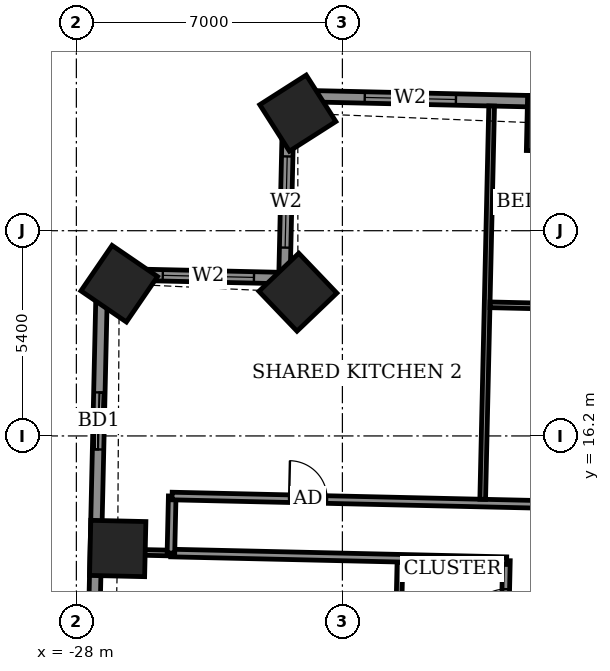
"""IFC4 building model, lengths in metres.
Left out: names, types, materials, properties, quantities, classifications, styles, units other than length and angle.
Written with IfcOpenShell. Run it as: python <this file> out.ifc"""

import sys

from ifc_helpers import new_model, si_unit, direction, frame, frame_2d, origin, origin_2d, place, context, subcontext, project, spatial, rectangle, extrude, element, fill, save


model = new_model("IFC4")
c1 = context("Model", 3, precision=1e-05, world=origin(), true_north=direction((0.0, 1.0)))
c2 = subcontext(c1, "Body", "Model", "MODEL_VIEW")
j1 = project(units=[si_unit("LENGTHUNIT", "METRE"), si_unit("PLANEANGLEUNIT", "RADIAN")], contexts=[c1])
p1 = place(None, origin())
s1 = spatial("IfcSite", under=j1, at=p1, CompositionType="ELEMENT")
p2 = place(p1, origin())
s2 = spatial("IfcBuilding", under=s1, at=p2, CompositionType="ELEMENT")
p3 = place(p2, frame((0.0, 0.0, 71.1)))
s3 = spatial("IfcBuildingStorey", under=s2, at=p3, CompositionType="ELEMENT", Elevation=71.1)
for number, where, z_axis, x_axis in (
    (1, (-15.418, 24.418, -0.55), (0.0, 0.0, 1.0), (-1.0, 0.023, 0.0)),
    (2, (-22.173, 24.694, -0.55), (0.0, 0.0, 1.0), (-0.843, -0.538, 0.0)),
    (3, (-22.171, 19.982, -0.55), (0.0, 0.0, 1.0), (-0.723, -0.691, 0.0)),
    (4, (-26.872, 20.205, -0.55), (0.0, 0.0, 1.0), (-0.565, -0.825, 0.0)),
    (5, (-26.912, 13.239, -0.55), (0.0, 0.0, 1.0), (-0.023, -1.0, 0.0)),
):
    element("IfcColumn", number, at=place(p3, frame(where, z_axis=z_axis, x_axis=x_axis)), inside=s3, PredefinedType="COLUMN", context=c2, shape_type="SweptSolid", body=[
        extrude(rectangle(XDim=1.45, YDim=1.45, at=origin_2d()), origin(), (0.0, 0.0, 1.0), 3.6),
    ])
p4 = place(p3, frame((27.407, 24.021, 0.0), z_axis=(0.0, 0.0, 1.0), x_axis=(-0.99974239923, 0.022696589664, 0.0)))
e6 = element("IfcWall", 6, at=p4, inside=s3, PredefinedType="SOLIDWALL", context=c2, shape_type="SweptSolid", body=[
    extrude(rectangle(XDim=49.836, YDim=0.3, at=frame_2d((24.918, 0.0))), origin(), (0.0, 0.0, 1.0), 3.05),
])
p5 = place(p4, frame((2.998, 0.0, 0.0)))
e7 = element("IfcOpeningElement", 7, at=p5, cuts=e6, PredefinedType="OPENING", context=c2, shape_type="SweptSolid", body=[
    extrude(rectangle(XDim=1.5, YDim=2.4, at=frame_2d((0.75, 1.2))), frame((0.0, 0.16, 0.0), z_axis=(0.0, -1.0, 0.0), x_axis=(1.0, 0.0, 0.0)), (0.0, 0.0, 1.0), 0.32),
])
p6 = place(p4, frame((9.086, 0.0, 0.0)))
e8 = element("IfcOpeningElement", 8, at=p6, cuts=e6, PredefinedType="OPENING", context=c2, shape_type="SweptSolid", body=[
    extrude(rectangle(XDim=1.5, YDim=2.4, at=frame_2d((0.75, 1.2))), frame((0.0, 0.16, 0.0), z_axis=(0.0, -1.0, 0.0), x_axis=(1.0, 0.0, 0.0)), (0.0, 0.0, 1.0), 0.32),
])
p7 = place(p4, frame((15.017, 0.0, 0.0)))
e9 = element("IfcOpeningElement", 9, at=p7, cuts=e6, PredefinedType="OPENING", context=c2, shape_type="SweptSolid", body=[
    extrude(rectangle(XDim=1.5, YDim=2.4, at=frame_2d((0.75, 1.2))), frame((0.0, 0.16, 0.0), z_axis=(0.0, -1.0, 0.0), x_axis=(1.0, 0.0, 0.0)), (0.0, 0.0, 1.0), 0.32),
])
p8 = place(p4, frame((18.124, 0.0, 0.0)))
e10 = element("IfcOpeningElement", 10, at=p8, cuts=e6, PredefinedType="OPENING", context=c2, shape_type="SweptSolid", body=[
    extrude(rectangle(XDim=1.5, YDim=2.4, at=frame_2d((0.75, 1.2))), frame((0.0, 0.16, 0.0), z_axis=(0.0, -1.0, 0.0), x_axis=(1.0, 0.0, 0.0)), (0.0, 0.0, 1.0), 0.32),
])
p9 = place(p4, frame((23.149, 0.0, 0.0)))
e11 = element("IfcOpeningElement", 11, at=p9, cuts=e6, PredefinedType="OPENING", context=c2, shape_type="SweptSolid", body=[
    extrude(rectangle(XDim=1.5, YDim=2.4, at=frame_2d((0.75, 1.2))), frame((0.0, 0.16, 0.0), z_axis=(0.0, -1.0, 0.0), x_axis=(1.0, 0.0, 0.0)), (0.0, 0.0, 1.0), 0.32),
])
p10 = place(p4, frame((26.405, 0.0, 0.0)))
e12 = element("IfcOpeningElement", 12, at=p10, cuts=e6, PredefinedType="OPENING", context=c2, shape_type="SweptSolid", body=[
    extrude(rectangle(XDim=1.2, YDim=2.4, at=frame_2d((0.6, 1.2))), frame((0.0, 0.16, 0.0), z_axis=(0.0, -1.0, 0.0), x_axis=(1.0, 0.0, 0.0)), (0.0, 0.0, 1.0), 0.32),
])
p11 = place(p4, frame((31.986, 0.0, 0.0)))
e13 = element("IfcOpeningElement", 13, at=p11, cuts=e6, PredefinedType="OPENING", context=c2, shape_type="SweptSolid", body=[
    extrude(rectangle(XDim=1.5, YDim=2.4, at=frame_2d((0.75, 1.2))), frame((0.0, 0.16, 0.0), z_axis=(0.0, -1.0, 0.0), x_axis=(1.0, 0.0, 0.0)), (0.0, 0.0, 1.0), 0.32),
])
p12 = place(p4, frame((37.211, 0.0, 0.0)))
e14 = element("IfcOpeningElement", 14, at=p12, cuts=e6, PredefinedType="OPENING", context=c2, shape_type="SweptSolid", body=[
    extrude(rectangle(XDim=1.5, YDim=2.4, at=frame_2d((0.75, 1.2))), frame((0.0, 0.16, 0.0), z_axis=(0.0, -1.0, 0.0), x_axis=(1.0, 0.0, 0.0)), (0.0, 0.0, 1.0), 0.32),
])
p13 = place(p4, frame((40.317, 0.0, 0.0)))
e15 = element("IfcOpeningElement", 15, at=p13, cuts=e6, PredefinedType="OPENING", context=c2, shape_type="SweptSolid", body=[
    extrude(rectangle(XDim=1.5, YDim=2.4, at=frame_2d((0.75, 1.2))), frame((0.0, 0.16, 0.0), z_axis=(0.0, -1.0, 0.0), x_axis=(1.0, 0.0, 0.0)), (0.0, 0.0, 1.0), 0.32),
])
p14 = place(p4, frame((45.431, 0.0, 0.9)))
e16 = element("IfcOpeningElement", 16, at=p14, cuts=e6, PredefinedType="OPENING", context=c2, shape_type="SweptSolid", body=[
    extrude(rectangle(XDim=2.4, YDim=1.5, at=frame_2d((1.2, 0.75))), frame((0.0, 0.16, 0.0), z_axis=(0.0, -1.0, 0.0), x_axis=(1.0, 0.0, 0.0)), (0.0, 0.0, 1.0), 0.32),
])
p15 = place(p3, frame((-22.415, 25.183, 0.0), z_axis=(0.0, 0.0, 1.0), x_axis=(-0.022739771436, -0.999741417965, 0.0)))
e17 = element("IfcWall", 17, at=p15, inside=s3, PredefinedType="SOLIDWALL", context=c2, shape_type="SweptSolid", body=[
    extrude(rectangle(XDim=4.831, YDim=0.3, at=frame_2d((2.416, 0.0))), origin(), (0.0, 0.0, 1.0), 2.55),
])
p16 = place(p15, frame((1.629, 0.0, 0.9)))
e18 = element("IfcOpeningElement", 18, at=p16, cuts=e17, PredefinedType="OPENING", context=c2, shape_type="SweptSolid", body=[
    extrude(rectangle(XDim=2.4, YDim=1.5, at=frame_2d((1.2, 0.75))), frame((0.0, 0.16, 0.0), z_axis=(0.0, -1.0, 0.0), x_axis=(1.0, 0.0, 0.0)), (0.0, 0.0, 1.0), 0.32),
])
p17 = place(p3, frame((-22.215, 20.346, 0.0), z_axis=(0.0, 0.0, 1.0), x_axis=(-0.999742476424, 0.022693189157, 0.0)))
e19 = element("IfcWall", 19, at=p17, inside=s3, PredefinedType="SOLIDWALL", context=c2, shape_type="SweptSolid", body=[
    extrude(rectangle(XDim=5.11, YDim=0.3, at=frame_2d((2.555, 0.0))), origin(), (0.0, 0.0, 1.0), 2.55),
])
p18 = place(p17, frame((1.112, 0.0, 0.9)))
e20 = element("IfcOpeningElement", 20, at=p18, cuts=e19, PredefinedType="OPENING", context=c2, shape_type="SweptSolid", body=[
    extrude(rectangle(XDim=2.4, YDim=1.5, at=frame_2d((1.2, 0.75))), frame((0.0, 0.16, 0.0), z_axis=(0.0, -1.0, 0.0), x_axis=(1.0, 0.0, 0.0)), (0.0, 0.0, 1.0), 0.32),
])
p19 = place(p3, frame((-27.324, 20.462, 0.0), z_axis=(0.0, 0.0, 1.0), x_axis=(-0.022695628174, -0.999742421057, 0.0)))
e21 = element("IfcWall", 21, at=p19, inside=s3, PredefinedType="SOLIDWALL", context=c2, shape_type="SweptSolid", body=[
    extrude(rectangle(XDim=14.63, YDim=0.3, at=frame_2d((7.315, 0.0))), origin(), (0.0, 0.0, 1.0), 3.05),
])
p20 = place(p19, frame((3.118, 0.0, 0.0)))
e22 = element("IfcOpeningElement", 22, at=p20, cuts=e21, PredefinedType="OPENING", context=c2, shape_type="SweptSolid", body=[
    extrude(rectangle(XDim=1.5, YDim=2.4, at=frame_2d((0.75, 1.2))), frame((0.0, 0.16, 0.0), z_axis=(0.0, -1.0, 0.0), x_axis=(1.0, 0.0, 0.0)), (0.0, 0.0, 1.0), 0.32),
])
p21 = place(p19, frame((8.431, 0.0, 0.9)))
e23 = element("IfcOpeningElement", 23, at=p21, cuts=e21, PredefinedType="OPENING", context=c2, shape_type="SweptSolid", body=[
    extrude(rectangle(XDim=2.4, YDim=1.5, at=frame_2d((1.2, 0.75))), frame((0.0, 0.16, 0.0), z_axis=(0.0, -1.0, 0.0), x_axis=(1.0, 0.0, 0.0)), (0.0, 0.0, 1.0), 0.32),
])
p22 = place(p19, frame((12.188, 0.0, 0.9)))
e24 = element("IfcOpeningElement", 24, at=p22, cuts=e21, PredefinedType="OPENING", context=c2, shape_type="SweptSolid", body=[
    extrude(rectangle(XDim=1.2, YDim=1.5, at=frame_2d((0.6, 0.75))), frame((0.0, 0.16, 0.0), z_axis=(0.0, -1.0, 0.0), x_axis=(1.0, 0.0, 0.0)), (0.0, 0.0, 1.0), 0.32),
])
p23 = place(p3, frame((-17.287, -13.625, 0.0), z_axis=(0.0, 0.0, 1.0), x_axis=(0.022712214871, 0.999742044377, 0.0)))
e25 = element("IfcWall", 25, at=p23, inside=s3, PredefinedType="PARTITIONING", context=c2, shape_type="SweptSolid", body=[
    extrude(rectangle(XDim=26.551, YDim=0.2, at=frame_2d((13.275, 0.0))), origin(), (0.0, 0.0, 1.0), 3.05),
])
p24 = place(p23, frame((22.738, 0.0, 0.0)))
e26 = element("IfcOpeningElement", 26, at=p24, cuts=e25, PredefinedType="OPENING", context=c2, shape_type="SweptSolid", body=[
    extrude(rectangle(XDim=1.0, YDim=2.1, at=frame_2d((0.5, 1.05))), frame((0.0, 0.11, 0.0), z_axis=(0.0, -1.0, 0.0), x_axis=(1.0, 0.0, 0.0)), (0.0, 0.0, 1.0), 0.22),
])
p25 = place(p23, frame((24.9, 0.0, 0.0)))
e27 = element("IfcOpeningElement", 27, at=p25, cuts=e25, PredefinedType="OPENING", context=c2, shape_type="SweptSolid", body=[
    extrude(rectangle(XDim=0.9, YDim=2.1, at=frame_2d((0.45, 1.05))), frame((0.0, 0.11, 0.0), z_axis=(0.0, -1.0, 0.0), x_axis=(1.0, 0.0, 0.0)), (0.0, 0.0, 1.0), 0.22),
])
p26 = place(p23, frame((20.3, 0.0, 0.0)))
e28 = element("IfcOpeningElement", 28, at=p26, cuts=e25, PredefinedType="OPENING", context=c2, shape_type="SweptSolid", body=[
    extrude(rectangle(XDim=1.0, YDim=2.1, at=frame_2d((0.5, 1.05))), frame((0.0, 0.11, 0.0), z_axis=(0.0, -1.0, 0.0), x_axis=(1.0, 0.0, 0.0)), (0.0, 0.0, 1.0), 0.22),
])
p27 = place(p23, frame((15.025, 0.0, 0.0)))
e29 = element("IfcOpeningElement", 29, at=p27, cuts=e25, PredefinedType="OPENING", context=c2, shape_type="SweptSolid", body=[
    extrude(rectangle(XDim=1.0, YDim=2.1, at=frame_2d((0.5, 1.05))), frame((0.0, 0.11, 0.0), z_axis=(0.0, -1.0, 0.0), x_axis=(1.0, 0.0, 0.0)), (0.0, 0.0, 1.0), 0.22),
])
p28 = place(p23, frame((17.525, 0.0, 0.0)))
e30 = element("IfcOpeningElement", 30, at=p28, cuts=e25, PredefinedType="OPENING", context=c2, shape_type="SweptSolid", body=[
    extrude(rectangle(XDim=0.9, YDim=2.1, at=frame_2d((0.45, 1.05))), frame((0.0, 0.11, 0.0), z_axis=(0.0, -1.0, 0.0), x_axis=(1.0, 0.0, 0.0)), (0.0, 0.0, 1.0), 0.22),
])
p29 = place(p23, frame((11.678, 0.0, 0.0)))
e31 = element("IfcOpeningElement", 31, at=p29, cuts=e25, PredefinedType="OPENING", context=c2, shape_type="SweptSolid", body=[
    extrude(rectangle(XDim=1.0, YDim=2.1, at=frame_2d((0.5, 1.05))), frame((0.0, 0.11, 0.0), z_axis=(0.0, -1.0, 0.0), x_axis=(1.0, 0.0, 0.0)), (0.0, 0.0, 1.0), 0.22),
])
p30 = place(p23, frame((8.45, 0.0, 0.0)))
e32 = element("IfcOpeningElement", 32, at=p30, cuts=e25, PredefinedType="OPENING", context=c2, shape_type="SweptSolid", body=[
    extrude(rectangle(XDim=1.0, YDim=2.1, at=frame_2d((0.5, 1.05))), frame((0.0, 0.11, 0.0), z_axis=(0.0, -1.0, 0.0), x_axis=(1.0, 0.0, 0.0)), (0.0, 0.0, 1.0), 0.22),
])
p31 = place(p23, frame((6.275, 0.0, 0.0)))
e33 = element("IfcOpeningElement", 33, at=p31, cuts=e25, PredefinedType="OPENING", context=c2, shape_type="SweptSolid", body=[
    extrude(rectangle(XDim=0.9, YDim=2.1, at=frame_2d((0.45, 1.05))), frame((0.0, 0.11, 0.0), z_axis=(0.0, -1.0, 0.0), x_axis=(1.0, 0.0, 0.0)), (0.0, 0.0, 1.0), 0.22),
])
p32 = place(p23, frame((1.062, 0.0, 0.0)))
e34 = element("IfcOpeningElement", 34, at=p32, cuts=e25, PredefinedType="OPENING", context=c2, shape_type="SweptSolid", body=[
    extrude(rectangle(XDim=1.0, YDim=2.1, at=frame_2d((0.5, 1.05))), frame((0.0, 0.11, 0.0), z_axis=(0.0, -1.0, 0.0), x_axis=(1.0, 0.0, 0.0)), (0.0, 0.0, 1.0), 0.22),
])
p33 = place(p23, frame((3.875, 0.0, 0.0)))
e35 = element("IfcOpeningElement", 35, at=p33, cuts=e25, PredefinedType="OPENING", context=c2, shape_type="SweptSolid", body=[
    extrude(rectangle(XDim=0.9, YDim=2.1, at=frame_2d((0.45, 1.05))), frame((0.0, 0.11, 0.0), z_axis=(0.0, -1.0, 0.0), x_axis=(1.0, 0.0, 0.0)), (0.0, 0.0, 1.0), 0.22),
])
p34 = place(p3, frame((-19.538, 10.583, 0.0), z_axis=(0.0, 0.0, 1.0), x_axis=(0.022612884682, 0.999744296031, 0.0)))
e36 = element("IfcWall", 36, at=p34, inside=s3, PredefinedType="PARTITIONING", context=c2, shape_type="SweptSolid", body=[
    extrude(rectangle(XDim=2.3, YDim=0.15, at=frame_2d((1.15, 0.0))), origin(), (0.0, 0.0, 1.0), 3.05),
])
p35 = place(p3, frame((-27.34, 13.16, 0.0), z_axis=(0.0, 0.0, 1.0), x_axis=(0.999748678707, -0.022418283238, 0.0)))
e37 = element("IfcWall", 37, at=p35, inside=s3, PredefinedType="PARTITIONING", context=c2, shape_type="SweptSolid", body=[
    extrude(rectangle(XDim=1.83, YDim=0.15, at=frame_2d((0.915, 0.0))), origin(), (0.0, 0.0, 1.0), 3.05),
])
p36 = place(p3, frame((-25.515, 13.119, 0.0), z_axis=(0.0, 0.0, 1.0), x_axis=(0.999741550249, -0.022733954903, 0.0)))
e38 = element("IfcWall", 38, at=p36, inside=s3, PredefinedType="PARTITIONING", context=c2, shape_type="SweptSolid", body=[
    extrude(rectangle(XDim=8.838, YDim=0.2, at=frame_2d((4.419, 0.0))), origin(), (0.0, 0.0, 1.0), 3.05),
])
p37 = place(p3, frame((-25.512, 13.119, 0.0), z_axis=(0.0, 0.0, 1.0), x_axis=(0.022617910375, 0.999744182344, 0.0)))
e39 = element("IfcWall", 39, at=p37, inside=s3, PredefinedType="PARTITIONING", context=c2, shape_type="SweptSolid", body=[
    extrude(rectangle(XDim=1.5, YDim=0.2, at=frame_2d((0.75, 0.0))), origin(), (0.0, 0.0, 1.0), 3.05),
])
p38 = place(p3, frame((-25.481, 14.619, 0.0), z_axis=(0.0, 0.0, 1.0), x_axis=(0.999742349682, -0.022698772048, 0.0)))
e40 = element("IfcWall", 40, at=p38, inside=s3, PredefinedType="PARTITIONING", context=c2, shape_type="SweptSolid", body=[
    extrude(rectangle(XDim=54.886, YDim=0.2, at=frame_2d((27.443, 0.0))), origin(), (0.0, 0.0, 1.0), 3.05),
])
p39 = place(p38, frame((52.093, 0.0, 0.0)))
e41 = element("IfcOpeningElement", 41, at=p39, cuts=e40, PredefinedType="OPENING", context=c2, shape_type="SweptSolid", body=[
    extrude(rectangle(XDim=1.0, YDim=2.1, at=frame_2d((0.5, 1.05))), frame((0.0, 0.11, 0.0), z_axis=(0.0, -1.0, 0.0), x_axis=(1.0, 0.0, 0.0)), (0.0, 0.0, 1.0), 0.22),
])
p40 = place(p38, frame((46.325, 0.0, 0.0)))
e42 = element("IfcOpeningElement", 42, at=p40, cuts=e40, PredefinedType="OPENING", context=c2, shape_type="SweptSolid", body=[
    extrude(rectangle(XDim=0.9, YDim=2.1, at=frame_2d((0.45, 1.05))), frame((0.0, 0.11, 0.0), z_axis=(0.0, -1.0, 0.0), x_axis=(1.0, 0.0, 0.0)), (0.0, 0.0, 1.0), 0.22),
])
p41 = place(p38, frame((41.275, 0.0, 0.0)))
e43 = element("IfcOpeningElement", 43, at=p41, cuts=e40, PredefinedType="OPENING", context=c2, shape_type="SweptSolid", body=[
    extrude(rectangle(XDim=0.9, YDim=2.1, at=frame_2d((0.45, 1.05))), frame((0.0, 0.11, 0.0), z_axis=(0.0, -1.0, 0.0), x_axis=(1.0, 0.0, 0.0)), (0.0, 0.0, 1.0), 0.22),
])
p42 = place(p38, frame((38.875, 0.0, 0.0)))
e44 = element("IfcOpeningElement", 44, at=p42, cuts=e40, PredefinedType="OPENING", context=c2, shape_type="SweptSolid", body=[
    extrude(rectangle(XDim=0.9, YDim=2.1, at=frame_2d((0.45, 1.05))), frame((0.0, 0.11, 0.0), z_axis=(0.0, -1.0, 0.0), x_axis=(1.0, 0.0, 0.0)), (0.0, 0.0, 1.0), 0.22),
])
p43 = place(p38, frame((31.95, 0.0, 0.0)))
e45 = element("IfcOpeningElement", 45, at=p43, cuts=e40, PredefinedType="OPENING", context=c2, shape_type="SweptSolid", body=[
    extrude(rectangle(XDim=0.9, YDim=2.1, at=frame_2d((0.45, 1.05))), frame((0.0, 0.11, 0.0), z_axis=(0.0, -1.0, 0.0), x_axis=(1.0, 0.0, 0.0)), (0.0, 0.0, 1.0), 0.22),
])
p44 = place(p38, frame((29.8, 0.0, 0.0)))
e46 = element("IfcOpeningElement", 46, at=p44, cuts=e40, PredefinedType="OPENING", context=c2, shape_type="SweptSolid", body=[
    extrude(rectangle(XDim=0.9, YDim=2.1, at=frame_2d((0.45, 1.05))), frame((0.0, 0.11, 0.0), z_axis=(0.0, -1.0, 0.0), x_axis=(1.0, 0.0, 0.0)), (0.0, 0.0, 1.0), 0.22),
])
p45 = place(p38, frame((22.875, 0.0, 0.0)))
e47 = element("IfcOpeningElement", 47, at=p45, cuts=e40, PredefinedType="OPENING", context=c2, shape_type="SweptSolid", body=[
    extrude(rectangle(XDim=0.9, YDim=2.1, at=frame_2d((0.45, 1.05))), frame((0.0, 0.11, 0.0), z_axis=(0.0, -1.0, 0.0), x_axis=(1.0, 0.0, 0.0)), (0.0, 0.0, 1.0), 0.22),
])
p46 = place(p38, frame((20.675, 0.0, 0.0)))
e48 = element("IfcOpeningElement", 48, at=p46, cuts=e40, PredefinedType="OPENING", context=c2, shape_type="SweptSolid", body=[
    extrude(rectangle(XDim=0.9, YDim=2.1, at=frame_2d((0.45, 1.05))), frame((0.0, 0.11, 0.0), z_axis=(0.0, -1.0, 0.0), x_axis=(1.0, 0.0, 0.0)), (0.0, 0.0, 1.0), 0.22),
])
p47 = place(p38, frame((13.525, 0.0, 0.0)))
e49 = element("IfcOpeningElement", 49, at=p47, cuts=e40, PredefinedType="OPENING", context=c2, shape_type="SweptSolid", body=[
    extrude(rectangle(XDim=0.9, YDim=2.1, at=frame_2d((0.45, 1.05))), frame((0.0, 0.11, 0.0), z_axis=(0.0, -1.0, 0.0), x_axis=(1.0, 0.0, 0.0)), (0.0, 0.0, 1.0), 0.22),
])
p48 = place(p38, frame((11.275, 0.0, 0.0)))
e50 = element("IfcOpeningElement", 50, at=p48, cuts=e40, PredefinedType="OPENING", context=c2, shape_type="SweptSolid", body=[
    extrude(rectangle(XDim=0.9, YDim=2.1, at=frame_2d((0.45, 1.05))), frame((0.0, 0.11, 0.0), z_axis=(0.0, -1.0, 0.0), x_axis=(1.0, 0.0, 0.0)), (0.0, 0.0, 1.0), 0.22),
])
p49 = place(p38, frame((3.079, 0.0, 0.0)))
e51 = element("IfcOpeningElement", 51, at=p49, cuts=e40, PredefinedType="OPENING", context=c2, shape_type="SweptSolid", body=[
    extrude(rectangle(XDim=1.0, YDim=2.1, at=frame_2d((0.5, 1.05))), frame((0.0, 0.11, 0.0), z_axis=(0.0, -1.0, 0.0), x_axis=(1.0, 0.0, 0.0)), (0.0, 0.0, 1.0), 0.22),
])
p50 = place(p3, frame((-17.308, 14.533, 0.0), z_axis=(0.0, 0.0, 1.0), x_axis=(0.022713904397, 0.999742005993, 0.0)))
e52 = element("IfcWall", 52, at=p50, inside=s3, PredefinedType="PARTITIONING", context=c2, shape_type="SweptSolid", body=[
    extrude(rectangle(XDim=10.351, YDim=0.15, at=frame_2d((5.175, 0.0))), origin(), (0.0, 0.0, 1.0), 2.55),
])
p51 = place(p3, frame((-17.115, 19.65, 0.0), z_axis=(0.0, 0.0, 1.0), x_axis=(0.999740478815, -0.022781023197, 0.0)))
e53 = element("IfcWall", 53, at=p51, inside=s3, PredefinedType="PARTITIONING", context=c2, shape_type="SweptSolid", body=[
    extrude(rectangle(XDim=2.325, YDim=0.15, at=frame_2d((1.163, 0.0))), origin(), (0.0, 0.0, 1.0), 3.05),
])
p52 = place(p14, origin())
e54 = element("IfcWindow", 54, at=p52, inside=s3, PartitioningType="DOUBLE_PANEL_VERTICAL", PredefinedType="WINDOW", context=c2, shape_type="SweptSolid", body=[
    extrude(rectangle(XDim=2.4, YDim=1.5, at=frame_2d((1.2, 0.75))), frame((0.0, 0.03, 0.0), z_axis=(0.0, -1.0, 0.0), x_axis=(1.0, 0.0, 0.0)), (0.0, 0.0, 1.0), 0.06),
])
fill(e16, e54)
p53 = place(p16, origin())
e55 = element("IfcWindow", 55, at=p53, inside=s3, PartitioningType="DOUBLE_PANEL_VERTICAL", PredefinedType="WINDOW", context=c2, shape_type="SweptSolid", body=[
    extrude(rectangle(XDim=2.4, YDim=1.5, at=frame_2d((1.2, 0.75))), frame((0.0, 0.03, 0.0), z_axis=(0.0, -1.0, 0.0), x_axis=(1.0, 0.0, 0.0)), (0.0, 0.0, 1.0), 0.06),
])
fill(e18, e55)
p54 = place(p18, origin())
e56 = element("IfcWindow", 56, at=p54, inside=s3, PartitioningType="DOUBLE_PANEL_VERTICAL", PredefinedType="WINDOW", context=c2, shape_type="SweptSolid", body=[
    extrude(rectangle(XDim=2.4, YDim=1.5, at=frame_2d((1.2, 0.75))), frame((0.0, 0.03, 0.0), z_axis=(0.0, -1.0, 0.0), x_axis=(1.0, 0.0, 0.0)), (0.0, 0.0, 1.0), 0.06),
])
fill(e20, e56)
p55 = place(p20, origin())
e57 = element("IfcDoor", 57, at=p55, inside=s3, OperationType="SLIDING_TO_LEFT", PredefinedType="DOOR", context=c2, shape_type="SweptSolid", body=[
    extrude(rectangle(XDim=1.5, YDim=2.4, at=frame_2d((0.75, 1.2))), frame((0.0, 0.025, 0.0), z_axis=(0.0, -1.0, 0.0), x_axis=(1.0, 0.0, 0.0)), (0.0, 0.0, 1.0), 0.05),
])
fill(e22, e57)
p56 = place(p49, origin())
e58 = element("IfcDoor", 58, at=p56, inside=s3, OperationType="SINGLE_SWING_RIGHT", PredefinedType="DOOR", context=c2, shape_type="SweptSolid", body=[
    extrude(rectangle(XDim=1.0, YDim=2.1, at=frame_2d((0.5, 1.05))), frame((0.0, 0.025, 0.0), z_axis=(0.0, -1.0, 0.0), x_axis=(1.0, 0.0, 0.0)), (0.0, 0.0, 1.0), 0.05),
])
fill(e51, e58)
p57 = place(p25, origin())
e59 = element("IfcDoor", 59, at=p57, inside=s3, OperationType="SINGLE_SWING_LEFT", PredefinedType="DOOR", context=c2, shape_type="SweptSolid", body=[
    extrude(rectangle(XDim=0.9, YDim=2.1, at=frame_2d((0.45, 1.05))), frame((0.0, 0.025, 0.0), z_axis=(0.0, -1.0, 0.0), x_axis=(1.0, 0.0, 0.0)), (0.0, 0.0, 1.0), 0.05),
])
fill(e27, e59)
save(model, sys.argv[1])
